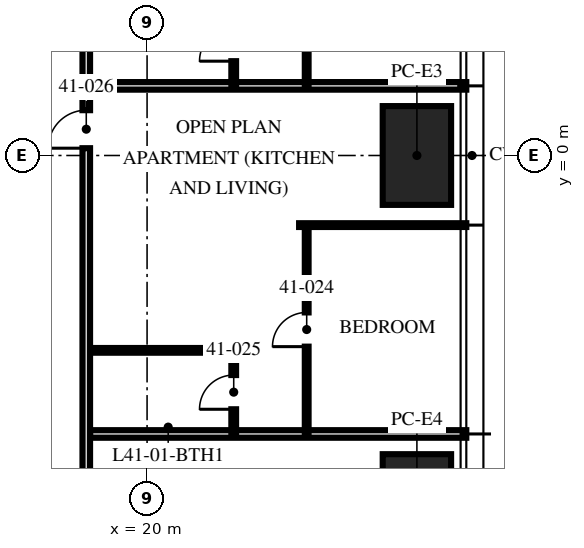
"""IFC4 building model, lengths in metres.
Left out: names, types, materials, properties, quantities, classifications, styles, units other than length and angle.
Written with IfcOpenShell. Run it as: python <this file> out.ifc"""

import sys

from ifc_helpers import new_model, si_unit, direction, frame, frame_2d, origin, origin_2d, place, context, subcontext, project, spatial, rectangle, extrude, element, fill, save


model = new_model("IFC4")
c1 = context("Model", 3, precision=1e-05, world=origin(), true_north=direction((0.0, 1.0)))
c2 = subcontext(c1, "Body", "Model", "MODEL_VIEW")
j1 = project(units=[si_unit("LENGTHUNIT", "METRE"), si_unit("PLANEANGLEUNIT", "RADIAN")], contexts=[c1])
p1 = place(None, origin())
s1 = spatial("IfcSite", under=j1, at=p1, CompositionType="ELEMENT")
p2 = place(p1, origin())
s2 = spatial("IfcBuilding", under=s1, at=p2, CompositionType="ELEMENT")
p3 = place(p2, frame((0.0, 0.0, 163.5)))
s3 = spatial("IfcBuildingStorey", under=s2, at=p3, CompositionType="ELEMENT", Elevation=163.5)
for number, where, z_axis, x_axis in (
    (1, (27.1, 0.0, 0.0), (0.0, 0.0, 1.0), (0.0, 1.0, 0.0)),
    (2, (27.1, -9.16, 0.0), (0.0, 0.0, 1.0), (0.0, 1.0, 0.0)),
):
    element("IfcColumn", number, at=place(p3, frame(where, z_axis=z_axis, x_axis=x_axis)), inside=s3, PredefinedType="COLUMN", context=c2, shape_type="SweptSolid", body=[
        extrude(rectangle(XDim=2.6, YDim=1.8, at=origin_2d()), origin(), (0.0, 0.0, 1.0), 3.75),
    ])
p4 = place(p3, frame((18.5, -7.328, 0.0), z_axis=(0.0, 0.0, 1.0), x_axis=(1.0, 0.0, 0.0)))
e3 = element("IfcWall", 3, at=p4, inside=s3, PredefinedType="PARTITIONING", context=c2, shape_type="SweptSolid", body=[
    extrude(rectangle(XDim=9.9, YDim=0.2, at=frame_2d((4.95, 0.0))), origin(), (0.0, 0.0, 1.0), 2.81),
])
p5 = place(p3, frame((24.0, -1.832, 0.0), z_axis=(0.0, 0.0, 1.0), x_axis=(1.0, 0.0, 0.0)))
e4 = element("IfcWall", 4, at=p5, inside=s3, PredefinedType="PARTITIONING", context=c2, shape_type="SweptSolid", body=[
    extrude(rectangle(XDim=4.4, YDim=0.1, at=frame_2d((2.2, 0.0))), origin(), (0.0, 0.0, 1.0), 2.81),
])
p6 = place(p3, frame((18.5, 1.832, 0.0), z_axis=(0.0, 0.0, 1.0), x_axis=(1.0, 0.0, 0.0)))
e5 = element("IfcWall", 5, at=p6, inside=s3, PredefinedType="PARTITIONING", context=c2, shape_type="SweptSolid", body=[
    extrude(rectangle(XDim=9.9, YDim=0.2, at=frame_2d((4.95, 0.0))), origin(), (0.0, 0.0, 1.0), 2.81),
])
p7 = place(p3, frame((24.2, -7.328, 0.0), z_axis=(0.0, 0.0, 1.0), x_axis=(0.0, 1.0, 0.0)))
e6 = element("IfcWall", 6, at=p7, inside=s3, PredefinedType="PARTITIONING", context=c2, shape_type="SweptSolid", body=[
    extrude(rectangle(XDim=5.496, YDim=0.1, at=frame_2d((2.748, 0.0))), origin(), (0.0, 0.0, 1.0), 2.81),
])
p8 = place(p7, frame((2.298, 0.0, 0.0)))
e7 = element("IfcOpeningElement", 7, at=p8, cuts=e6, PredefinedType="OPENING", context=c2, shape_type="SweptSolid", body=[
    extrude(rectangle(XDim=0.9, YDim=2.1, at=frame_2d((0.45, 1.05))), frame((0.0, 0.06, 0.0), z_axis=(0.0, -1.0, 0.0), x_axis=(1.0, 0.0, 0.0)), (0.0, 0.0, 1.0), 0.12),
])
p9 = place(p3, frame((22.28, -7.328, 0.0), z_axis=(0.0, 0.0, 1.0), x_axis=(0.0, 1.0, 0.0)))
e8 = element("IfcWall", 8, at=p9, inside=s3, PredefinedType="PARTITIONING", context=c2, shape_type="SweptSolid", body=[
    extrude(rectangle(XDim=2.2, YDim=0.125, at=frame_2d((1.1, 0.0))), origin(), (0.0, 0.0, 1.0), 3.5),
])
p10 = place(p9, frame((0.65, 0.0, 0.0)))
e9 = element("IfcOpeningElement", 9, at=p10, cuts=e8, PredefinedType="OPENING", context=c2, shape_type="SweptSolid", body=[
    extrude(rectangle(XDim=0.9, YDim=2.1, at=frame_2d((0.45, 1.05))), frame((0.0, 0.073, 0.0), z_axis=(0.0, -1.0, 0.0), x_axis=(1.0, 0.0, 0.0)), (0.0, 0.0, 1.0), 0.145),
])
p11 = place(p3, frame((18.5, -5.128, 0.0), z_axis=(0.0, 0.0, 1.0), x_axis=(1.0, 0.0, 0.0)))
e10 = element("IfcWall", 10, at=p11, inside=s3, PredefinedType="PARTITIONING", context=c2, shape_type="SweptSolid", body=[
    extrude(rectangle(XDim=3.78, YDim=0.125, at=frame_2d((1.89, 0.0))), origin(), (0.0, 0.0, 1.0), 3.5),
])
p12 = place(p3, frame((24.2, 1.832, 0.0), z_axis=(0.0, 0.0, 1.0), x_axis=(0.0, 1.0, 0.0)))
e11 = element("IfcWall", 11, at=p12, inside=s3, PredefinedType="PARTITIONING", context=c2, shape_type="SweptSolid", body=[
    extrude(rectangle(XDim=5.496, YDim=0.1, at=frame_2d((2.748, 0.0))), origin(), (0.0, 0.0, 1.0), 2.81),
])
p13 = place(p12, frame((2.298, 0.0, 0.0)))
e12 = element("IfcOpeningElement", 12, at=p13, cuts=e11, PredefinedType="OPENING", context=c2, shape_type="SweptSolid", body=[
    extrude(rectangle(XDim=0.9, YDim=2.1, at=frame_2d((0.45, 1.05))), frame((0.0, 0.06, 0.0), z_axis=(0.0, -1.0, 0.0), x_axis=(1.0, 0.0, 0.0)), (0.0, 0.0, 1.0), 0.12),
])
p14 = place(p3, frame((22.28, 1.832, 0.0), z_axis=(0.0, 0.0, 1.0), x_axis=(0.0, 1.0, 0.0)))
e13 = element("IfcWall", 13, at=p14, inside=s3, PredefinedType="PARTITIONING", context=c2, shape_type="SweptSolid", body=[
    extrude(rectangle(XDim=2.2, YDim=0.125, at=frame_2d((1.1, 0.0))), origin(), (0.0, 0.0, 1.0), 3.5),
])
p15 = place(p14, frame((0.65, 0.0, 0.0)))
e14 = element("IfcOpeningElement", 14, at=p15, cuts=e13, PredefinedType="OPENING", context=c2, shape_type="SweptSolid", body=[
    extrude(rectangle(XDim=0.9, YDim=2.1, at=frame_2d((0.45, 1.05))), frame((0.0, 0.073, 0.0), z_axis=(0.0, -1.0, 0.0), x_axis=(1.0, 0.0, 0.0)), (0.0, 0.0, 1.0), 0.145),
])
p16 = place(p3, frame((18.4, -18.3, 0.0), z_axis=(0.0, 0.0, 1.0), x_axis=(0.0, 1.0, 0.0)))
e15 = element("IfcWall", 15, at=p16, inside=s3, PredefinedType="PARTITIONING", context=c2, shape_type="SweptSolid", body=[
    extrude(rectangle(XDim=35.0, YDim=0.2, at=frame_2d((17.5, 0.0))), origin(), (0.0, 0.0, 1.0), 2.3),
])
p17 = place(p16, frame((18.492, 0.0, 0.0)))
e16 = element("IfcOpeningElement", 16, at=p17, cuts=e15, PredefinedType="OPENING", context=c2, shape_type="SweptSolid", body=[
    extrude(rectangle(XDim=1.0, YDim=2.2, at=frame_2d((0.5, 1.1))), frame((0.0, 0.11, 0.0), z_axis=(0.0, -1.0, 0.0), x_axis=(1.0, 0.0, 0.0)), (0.0, 0.0, 1.0), 0.22),
])
p18 = place(p16, frame((32.652, 0.0, 0.0)))
e17 = element("IfcOpeningElement", 17, at=p18, cuts=e15, PredefinedType="OPENING", context=c2, shape_type="SweptSolid", body=[
    extrude(rectangle(XDim=1.0, YDim=2.2, at=frame_2d((0.5, 1.1))), frame((0.0, 0.11, 0.0), z_axis=(0.0, -1.0, 0.0), x_axis=(1.0, 0.0, 0.0)), (0.0, 0.0, 1.0), 0.22),
])
p19 = place(p8, origin())
e18 = element("IfcDoor", 18, at=p19, inside=s3, OperationType="SINGLE_SWING_LEFT", PredefinedType="DOOR", context=c2, shape_type="SweptSolid", body=[
    extrude(rectangle(XDim=0.9, YDim=2.1, at=frame_2d((0.45, 1.05))), frame((0.0, 0.025, 0.0), z_axis=(0.0, -1.0, 0.0), x_axis=(1.0, 0.0, 0.0)), (0.0, 0.0, 1.0), 0.05),
])
fill(e7, e18)
p20 = place(p10, origin())
e19 = element("IfcDoor", 19, at=p20, inside=s3, OperationType="SINGLE_SWING_LEFT", PredefinedType="DOOR", context=c2, shape_type="SweptSolid", body=[
    extrude(rectangle(XDim=0.9, YDim=2.1, at=frame_2d((0.45, 1.05))), frame((0.0, 0.025, 0.0), z_axis=(0.0, -1.0, 0.0), x_axis=(1.0, 0.0, 0.0)), (0.0, 0.0, 1.0), 0.05),
])
fill(e9, e19)
p21 = place(p17, origin())
e20 = element("IfcDoor", 20, at=p21, inside=s3, OperationType="SINGLE_SWING_LEFT", PredefinedType="DOOR", context=c2, shape_type="SweptSolid", body=[
    extrude(rectangle(XDim=1.0, YDim=2.2, at=frame_2d((0.5, 1.1))), frame((0.0, 0.025, 0.0), z_axis=(0.0, -1.0, 0.0), x_axis=(1.0, 0.0, 0.0)), (0.0, 0.0, 1.0), 0.05),
])
fill(e16, e20)
p22 = place(p15, origin())
e21 = element("IfcDoor", 21, at=p22, inside=s3, OperationType="SINGLE_SWING_LEFT", PredefinedType="DOOR", context=c2, shape_type="SweptSolid", body=[
    extrude(rectangle(XDim=0.9, YDim=2.1, at=frame_2d((0.45, 1.05))), frame((0.0, 0.025, 0.0), z_axis=(0.0, -1.0, 0.0), x_axis=(1.0, 0.0, 0.0)), (0.0, 0.0, 1.0), 0.05),
])
fill(e14, e21)
save(model, sys.argv[1])
